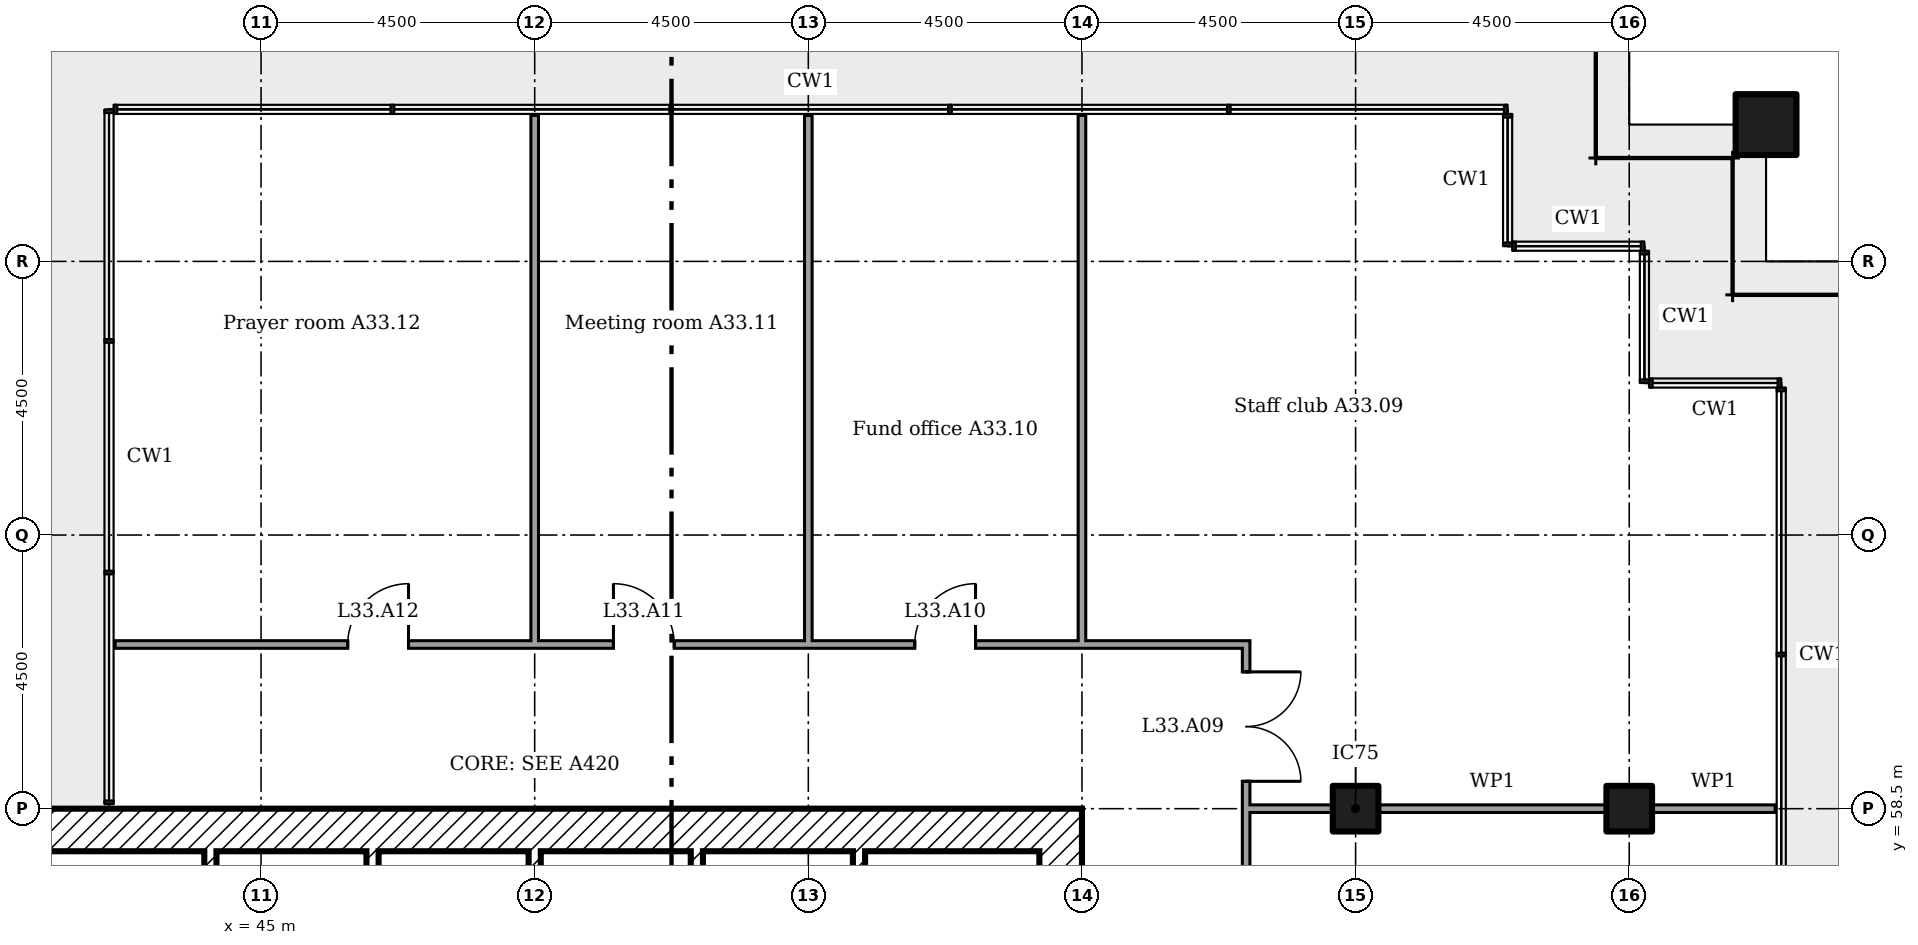
"""IFC4 building model, lengths in metres.
Left out: names, types, materials, properties, quantities, classifications, styles, units other than length and angle.
Written with IfcOpenShell. Run it as: python <this file> out.ifc"""

import sys

from ifc_helpers import new_model, si_unit, direction, frame, frame_2d, origin, origin_2d, place, context, subcontext, project, spatial, rectangle, extrude, element, fill, save


model = new_model("IFC4")
c1 = context("Model", 3, precision=1e-05, world=origin(), true_north=direction((0.0, 1.0)))
c2 = subcontext(c1, "Body", "Model", "MODEL_VIEW")
j1 = project(units=[si_unit("LENGTHUNIT", "METRE"), si_unit("PLANEANGLEUNIT", "RADIAN")], contexts=[c1])
p1 = place(None, origin())
s1 = spatial("IfcSite", under=j1, at=p1, CompositionType="ELEMENT")
p2 = place(p1, origin())
s2 = spatial("IfcBuilding", under=s1, at=p2, CompositionType="ELEMENT")
p3 = place(p2, frame((0.0, 0.0, 135.2)))
s3 = spatial("IfcBuildingStorey", under=s2, at=p3, CompositionType="ELEMENT", Elevation=135.2)
p4 = place(p3, frame((69.75, 69.75, 0.0)))
e1 = element("IfcColumn", 1, at=p4, inside=s3, PredefinedType="COLUMN", context=c2, shape_type="SweptSolid", body=[
    extrude(rectangle(XDim=1.0, YDim=1.0, at=origin_2d()), origin(), (0.0, 0.0, 1.0), 3.6),
])
for number, where in (
    (2, (63.0, 58.5, 0.0)),
    (3, (67.5, 58.5, 0.0)),
):
    element("IfcColumn", number, at=place(p3, frame(where)), inside=s3, PredefinedType="COLUMN", context=c2, shape_type="SweptSolid", body=[
        extrude(rectangle(XDim=0.75, YDim=0.75, at=origin_2d()), origin(), (0.0, 0.0, 1.0), 3.6),
    ])
p5 = place(p3, frame((58.15, 40.5, 0.0), z_axis=(0.0, 0.0, 1.0), x_axis=(0.0, 1.0, 0.0)))
e4 = element("IfcWall", 4, at=p5, inside=s3, PredefinedType="SHEAR", context=c2, shape_type="SweptSolid", body=[
    extrude(rectangle(XDim=18.0, YDim=0.7, at=frame_2d((9.0, 0.0))), origin(), (0.0, 0.0, 1.0), 3.3),
])
p6 = place(p5, frame((13.15, 0.0, 0.0)))
e5 = element("IfcOpeningElement", 5, at=p6, cuts=e4, PredefinedType="OPENING", context=c2, shape_type="SweptSolid", body=[
    extrude(rectangle(XDim=1.2, YDim=2.1, at=frame_2d((0.6, 1.05))), frame((0.0, 0.36, 0.0), z_axis=(0.0, -1.0, 0.0), x_axis=(1.0, 0.0, 0.0)), (0.0, 0.0, 1.0), 0.72),
])
p7 = place(p5, frame((3.9, 0.0, 0.0)))
e6 = element("IfcOpeningElement", 6, at=p7, cuts=e4, PredefinedType="OPENING", context=c2, shape_type="SweptSolid", body=[
    extrude(rectangle(XDim=1.8, YDim=2.1, at=frame_2d((0.9, 1.05))), frame((0.0, 0.36, 0.0), z_axis=(0.0, -1.0, 0.0), x_axis=(1.0, 0.0, 0.0)), (0.0, 0.0, 1.0), 0.72),
])
p8 = place(p5, frame((11.525, 0.0, 0.0)))
e7 = element("IfcOpeningElement", 7, at=p8, cuts=e4, PredefinedType="OPENING", context=c2, shape_type="SweptSolid", body=[
    extrude(rectangle(XDim=1.0, YDim=2.1, at=frame_2d((0.5, 1.05))), frame((0.0, 0.36, 0.0), z_axis=(0.0, -1.0, 0.0), x_axis=(1.0, 0.0, 0.0)), (0.0, 0.0, 1.0), 0.72),
])
p9 = place(p3, frame((41.2, 58.15, 0.0)))
e8 = element("IfcWall", 8, at=p9, inside=s3, PredefinedType="SHEAR", context=c2, shape_type="SweptSolid", body=[
    extrude(rectangle(XDim=16.6, YDim=0.7, at=frame_2d((8.3, 0.0))), origin(), (0.0, 0.0, 1.0), 3.3),
])
p10 = place(p3, frame((44.167, 57.8, 0.0), z_axis=(0.0, 0.0, 1.0), x_axis=(0.0, -1.0, 0.0)))
e9 = element("IfcWall", 9, at=p10, inside=s3, PredefinedType="SHEAR", context=c2, shape_type="SweptSolid", body=[
    extrude(rectangle(XDim=3.4, YDim=0.2, at=frame_2d((1.7, 0.0))), origin(), (0.0, 0.0, 1.0), 3.3),
])
p11 = place(p3, frame((46.833, 57.8, 0.0), z_axis=(0.0, 0.0, 1.0), x_axis=(0.0, -1.0, 0.0)))
e10 = element("IfcWall", 10, at=p11, inside=s3, PredefinedType="SHEAR", context=c2, shape_type="SweptSolid", body=[
    extrude(rectangle(XDim=4.5, YDim=0.2, at=frame_2d((2.25, 0.0))), origin(), (0.0, 0.0, 1.0), 3.3),
])
for number, where, z_axis, x_axis in (
    (11, (49.5, 57.8, 0.0), (0.0, 0.0, 1.0), (0.0, -1.0, 0.0)),
    (12, (52.167, 57.8, 0.0), (0.0, 0.0, 1.0), (0.0, -1.0, 0.0)),
    (13, (54.833, 57.8, 0.0), (0.0, 0.0, 1.0), (0.0, -1.0, 0.0)),
):
    element("IfcWall", number, at=place(p3, frame(where, z_axis=z_axis, x_axis=x_axis)), inside=s3, PredefinedType="SHEAR", context=c2, shape_type="SweptSolid", body=[
        extrude(rectangle(XDim=2.6, YDim=0.2, at=frame_2d((1.3, 0.0))), origin(), (0.0, 0.0, 1.0), 3.3),
    ])
p12 = place(p3, frame((61.2, 58.5, 0.0)))
e14 = element("IfcWall", 14, at=p12, inside=s3, PredefinedType="PARTITIONING", context=c2, shape_type="SweptSolid", body=[
    extrude(rectangle(XDim=1.425, YDim=0.125, at=frame_2d((0.712, 0.0))), origin(), (0.0, 0.0, 1.0), 2.457),
])
p13 = place(p3, frame((63.375, 58.5, 0.0)))
e15 = element("IfcWall", 15, at=p13, inside=s3, PredefinedType="PARTITIONING", context=c2, shape_type="SweptSolid", body=[
    extrude(rectangle(XDim=3.75, YDim=0.125, at=frame_2d((1.875, 0.0))), origin(), (0.0, 0.0, 1.0), 2.457),
])
p14 = place(p3, frame((67.875, 58.5, 0.0)))
e16 = element("IfcWall", 16, at=p14, inside=s3, PredefinedType="PARTITIONING", context=c2, shape_type="SweptSolid", body=[
    extrude(rectangle(XDim=2.025, YDim=0.125, at=frame_2d((1.012, 0.0))), origin(), (0.0, 0.0, 1.0), 2.457),
])
p15 = place(p3, frame((42.6, 61.2, 0.0)))
e17 = element("IfcWall", 17, at=p15, inside=s3, PredefinedType="PARTITIONING", context=c2, shape_type="SweptSolid", body=[
    extrude(rectangle(XDim=18.662, YDim=0.125, at=frame_2d((9.331, 0.0))), origin(), (0.0, 0.0, 1.0), 3.4),
])
p16 = place(p15, frame((13.15, 0.0, 0.0)))
e18 = element("IfcOpeningElement", 18, at=p16, cuts=e17, PredefinedType="OPENING", context=c2, shape_type="SweptSolid", body=[
    extrude(rectangle(XDim=1.0, YDim=2.1, at=frame_2d((0.5, 1.05))), frame((0.0, 0.073, 0.0), z_axis=(0.0, -1.0, 0.0), x_axis=(1.0, 0.0, 0.0)), (0.0, 0.0, 1.0), 0.145),
])
p17 = place(p15, frame((8.195, 0.0, 0.0)))
e19 = element("IfcOpeningElement", 19, at=p17, cuts=e17, PredefinedType="OPENING", context=c2, shape_type="SweptSolid", body=[
    extrude(rectangle(XDim=1.0, YDim=2.1, at=frame_2d((0.5, 1.05))), frame((0.0, 0.073, 0.0), z_axis=(0.0, -1.0, 0.0), x_axis=(1.0, 0.0, 0.0)), (0.0, 0.0, 1.0), 0.145),
])
p18 = place(p15, frame((3.825, 0.0, 0.0)))
e20 = element("IfcOpeningElement", 20, at=p18, cuts=e17, PredefinedType="OPENING", context=c2, shape_type="SweptSolid", body=[
    extrude(rectangle(XDim=1.0, YDim=2.1, at=frame_2d((0.5, 1.05))), frame((0.0, 0.073, 0.0), z_axis=(0.0, -1.0, 0.0), x_axis=(1.0, 0.0, 0.0)), (0.0, 0.0, 1.0), 0.145),
])
for number, where, z_axis, x_axis in (
    (21, (49.5, 61.2, 0.0), (0.0, 0.0, 1.0), (0.0, 1.0, 0.0)),
    (22, (54.0, 61.2, 0.0), (0.0, 0.0, 1.0), (0.0, 1.0, 0.0)),
    (23, (58.5, 61.2, 0.0), (0.0, 0.0, 1.0), (0.0, 1.0, 0.0)),
):
    element("IfcWall", number, at=place(p3, frame(where, z_axis=z_axis, x_axis=x_axis)), inside=s3, PredefinedType="PARTITIONING", context=c2, shape_type="SweptSolid", body=[
        extrude(rectangle(XDim=8.7, YDim=0.125, at=frame_2d((4.35, 0.0))), origin(), (0.0, 0.0, 1.0), 2.626),
    ])
p19 = place(p3, frame((61.2, 37.863, 0.0), z_axis=(0.0, 0.0, 1.0), x_axis=(0.0, 1.0, 0.0)))
e24 = element("IfcWall", 24, at=p19, inside=s3, PredefinedType="PARTITIONING", context=c2, shape_type="SweptSolid", body=[
    extrude(rectangle(XDim=23.275, YDim=0.125, at=frame_2d((11.637, 0.0))), origin(), (0.0, 0.0, 1.0), 3.4),
])
p20 = place(p19, frame((3.933, 0.0, 0.0)))
e25 = element("IfcOpeningElement", 25, at=p20, cuts=e24, PredefinedType="OPENING", context=c2, shape_type="SweptSolid", body=[
    extrude(rectangle(XDim=1.0, YDim=2.1, at=frame_2d((0.5, 1.05))), frame((0.0, 0.073, 0.0), z_axis=(0.0, -1.0, 0.0), x_axis=(1.0, 0.0, 0.0)), (0.0, 0.0, 1.0), 0.145),
])
p21 = place(p19, frame((9.343, 0.0, 0.0)))
e26 = element("IfcOpeningElement", 26, at=p21, cuts=e24, PredefinedType="OPENING", context=c2, shape_type="SweptSolid", body=[
    extrude(rectangle(XDim=1.0, YDim=2.1, at=frame_2d((0.5, 1.05))), frame((0.0, 0.073, 0.0), z_axis=(0.0, -1.0, 0.0), x_axis=(1.0, 0.0, 0.0)), (0.0, 0.0, 1.0), 0.145),
])
p22 = place(p19, frame((13.387, 0.0, 0.0)))
e27 = element("IfcOpeningElement", 27, at=p22, cuts=e24, PredefinedType="OPENING", context=c2, shape_type="SweptSolid", body=[
    extrude(rectangle(XDim=1.0, YDim=2.1, at=frame_2d((0.5, 1.05))), frame((0.0, 0.073, 0.0), z_axis=(0.0, -1.0, 0.0), x_axis=(1.0, 0.0, 0.0)), (0.0, 0.0, 1.0), 0.145),
])
p23 = place(p19, frame((17.433, 0.0, 0.0)))
e28 = element("IfcOpeningElement", 28, at=p23, cuts=e24, PredefinedType="OPENING", context=c2, shape_type="SweptSolid", body=[
    extrude(rectangle(XDim=1.0, YDim=2.1, at=frame_2d((0.5, 1.05))), frame((0.0, 0.073, 0.0), z_axis=(0.0, -1.0, 0.0), x_axis=(1.0, 0.0, 0.0)), (0.0, 0.0, 1.0), 0.145),
])
p24 = place(p19, frame((21.087, 0.0, 0.0)))
e29 = element("IfcOpeningElement", 29, at=p24, cuts=e24, PredefinedType="OPENING", context=c2, shape_type="SweptSolid", body=[
    extrude(rectangle(XDim=1.8, YDim=2.1, at=frame_2d((0.9, 1.05))), frame((0.0, 0.073, 0.0), z_axis=(0.0, -1.0, 0.0), x_axis=(1.0, 0.0, 0.0)), (0.0, 0.0, 1.0), 0.145),
])
p25 = place(p24, frame((1.8, 0.0, 0.0), x_axis=(-1.0, 0.0, 0.0)))
e30 = element("IfcDoor", 30, at=p25, inside=s3, OperationType="DOUBLE_DOOR_SINGLE_SWING", PredefinedType="DOOR", context=c2, shape_type="SweptSolid", body=[
    extrude(rectangle(XDim=1.8, YDim=2.1, at=frame_2d((0.9, 1.05))), frame((0.0, 0.025, 0.0), z_axis=(0.0, -1.0, 0.0), x_axis=(1.0, 0.0, 0.0)), (0.0, 0.0, 1.0), 0.05),
])
fill(e29, e30)
p26 = place(p16, origin())
e31 = element("IfcDoor", 31, at=p26, inside=s3, OperationType="SINGLE_SWING_LEFT", PredefinedType="DOOR", context=c2, shape_type="SweptSolid", body=[
    extrude(rectangle(XDim=1.0, YDim=2.1, at=frame_2d((0.5, 1.05))), frame((0.0, 0.025, 0.0), z_axis=(0.0, -1.0, 0.0), x_axis=(1.0, 0.0, 0.0)), (0.0, 0.0, 1.0), 0.05),
])
fill(e18, e31)
p27 = place(p17, origin())
e32 = element("IfcDoor", 32, at=p27, inside=s3, OperationType="SINGLE_SWING_RIGHT", PredefinedType="DOOR", context=c2, shape_type="SweptSolid", body=[
    extrude(rectangle(XDim=1.0, YDim=2.1, at=frame_2d((0.5, 1.05))), frame((0.0, 0.025, 0.0), z_axis=(0.0, -1.0, 0.0), x_axis=(1.0, 0.0, 0.0)), (0.0, 0.0, 1.0), 0.05),
])
fill(e19, e32)
p28 = place(p18, origin())
e33 = element("IfcDoor", 33, at=p28, inside=s3, OperationType="SINGLE_SWING_LEFT", PredefinedType="DOOR", context=c2, shape_type="SweptSolid", body=[
    extrude(rectangle(XDim=1.0, YDim=2.1, at=frame_2d((0.5, 1.05))), frame((0.0, 0.025, 0.0), z_axis=(0.0, -1.0, 0.0), x_axis=(1.0, 0.0, 0.0)), (0.0, 0.0, 1.0), 0.05),
])
fill(e20, e33)
save(model, sys.argv[1])
